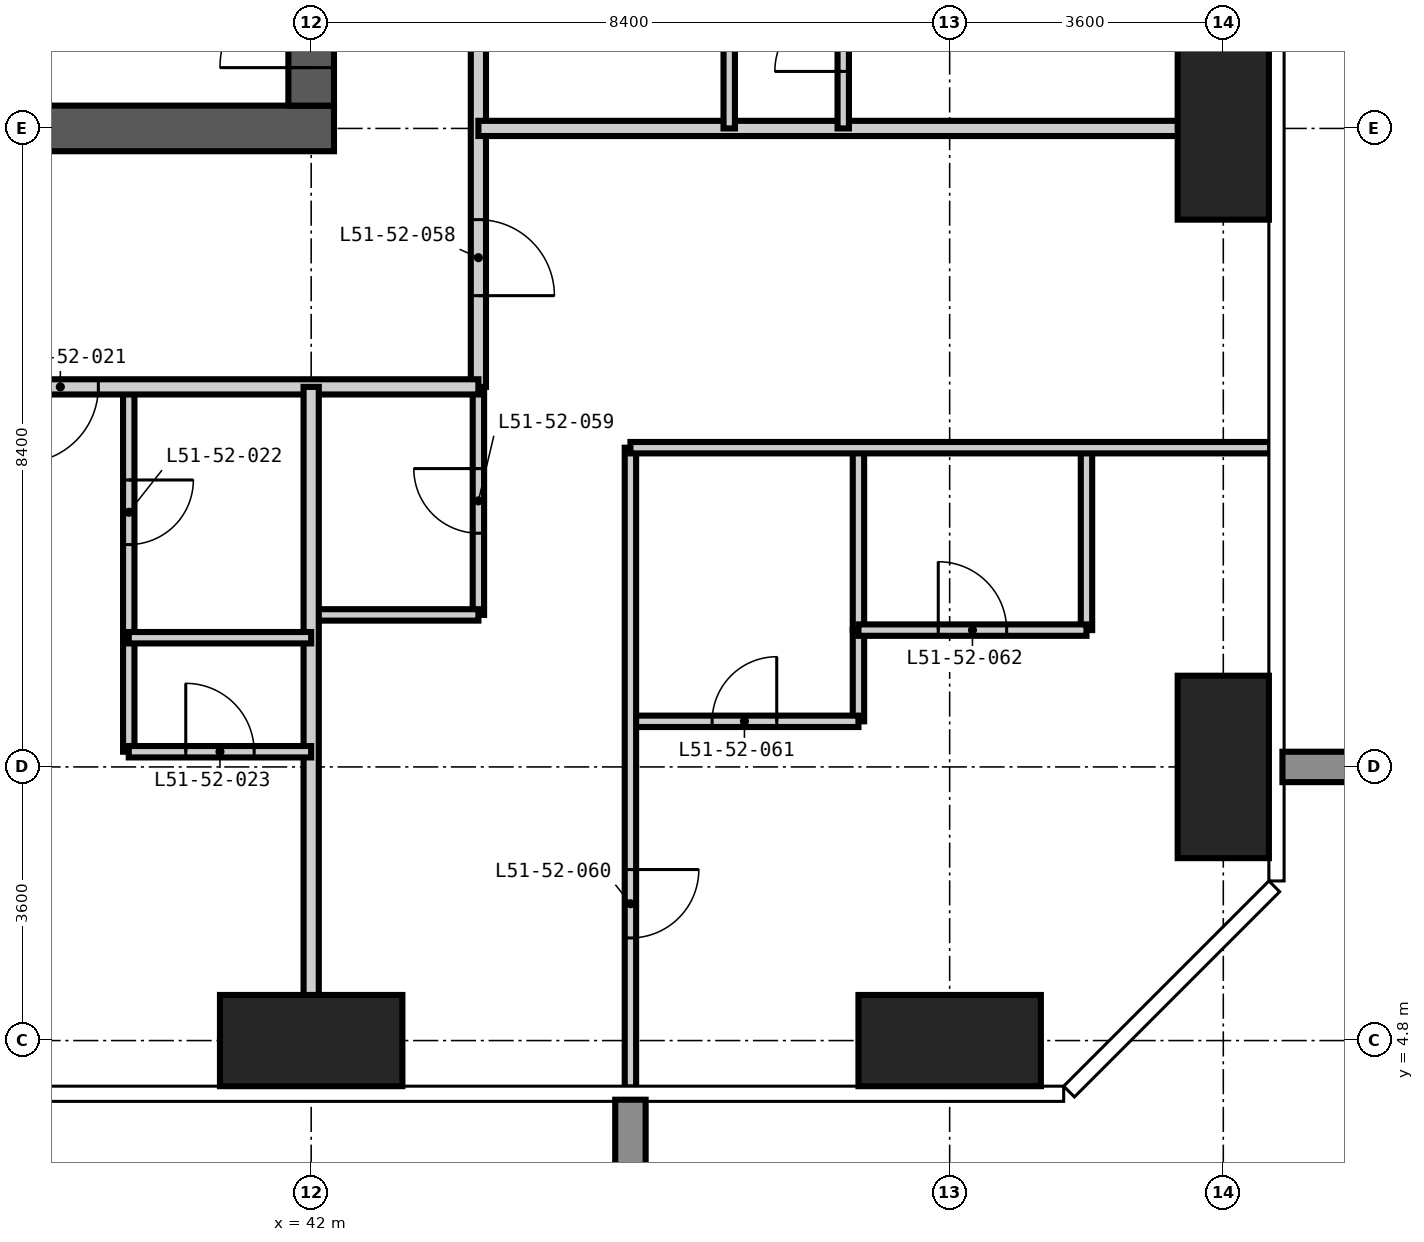
"""IFC4 building model, lengths in metres.
Left out: names, types, materials, properties, quantities, classifications, styles, units other than length and angle.
Written with IfcOpenShell. Run it as: python <this file> out.ifc"""

import sys

from ifc_helpers import new_model, si_unit, direction, frame, frame_2d, origin, origin_2d, place, context, subcontext, project, spatial, rectangle, extrude, element, fill, save


model = new_model("IFC4")
c1 = context("Model", 3, precision=1e-05, world=origin(), true_north=direction((0.0, 1.0)))
c2 = subcontext(c1, "Body", "Model", "MODEL_VIEW")
j1 = project(units=[si_unit("LENGTHUNIT", "METRE"), si_unit("PLANEANGLEUNIT", "RADIAN")], contexts=[c1])
p1 = place(None, origin())
s1 = spatial("IfcSite", under=j1, at=p1, CompositionType="ELEMENT")
p2 = place(p1, origin())
s2 = spatial("IfcBuilding", under=s1, at=p2, CompositionType="ELEMENT")
p3 = place(p2, frame((0.0, 0.0, 198.6)))
s3 = spatial("IfcBuildingStorey", under=s2, at=p3, CompositionType="ELEMENT", Elevation=198.6)
for number, where, z_axis, x_axis in (
    (1, (42.0, 4.8, -0.35), (0.0, 0.0, 1.0), (1.0, 0.0, 0.0)),
    (2, (50.4, 4.8, -0.35), (0.0, 0.0, 1.0), (1.0, 0.0, 0.0)),
):
    element("IfcColumn", number, at=place(p3, frame(where, z_axis=z_axis, x_axis=x_axis)), inside=s3, PredefinedType="COLUMN", context=c2, shape_type="SweptSolid", body=[
        extrude(rectangle(XDim=2.4, YDim=1.2, at=origin_2d()), origin(), (0.0, 0.0, 1.0), 3.6),
    ])
for number, where, z_axis, x_axis in (
    (3, (54.0, 8.4, -0.35), (0.0, 0.0, 1.0), (1.0, 0.0, 0.0)),
    (4, (54.0, 16.8, -0.35), (0.0, 0.0, 1.0), (1.0, 0.0, 0.0)),
):
    element("IfcColumn", number, at=place(p3, frame(where, z_axis=z_axis, x_axis=x_axis)), inside=s3, PredefinedType="COLUMN", context=c2, shape_type="SweptSolid", body=[
        extrude(rectangle(XDim=1.2, YDim=2.4, at=origin_2d()), origin(), (0.0, 0.0, 1.0), 3.6),
    ])
p4 = place(p3, frame((16.5, 16.8, -0.35), z_axis=(0.0, 0.0, 1.0), x_axis=(1.0, 0.0, 0.0)))
e5 = element("IfcWall", 5, at=p4, inside=s3, PredefinedType="SHEAR", context=c2, shape_type="SweptSolid", body=[
    extrude(rectangle(XDim=25.8, YDim=0.6, at=frame_2d((12.9, 0.0))), origin(), (0.0, 0.0, 1.0), 3.6),
])
p5 = place(p4, frame((12.4, 0.0, 0.35)))
e6 = element("IfcOpeningElement", 6, at=p5, cuts=e5, PredefinedType="OPENING", context=c2, shape_type="SweptSolid", body=[
    extrude(rectangle(XDim=1.0, YDim=2.1, at=frame_2d((0.5, 1.05))), frame((0.0, 0.31, 0.0), z_axis=(0.0, -1.0, 0.0), x_axis=(1.0, 0.0, 0.0)), (0.0, 0.0, 1.0), 0.62),
])
p6 = place(p4, frame((18.7, 0.0, 0.35)))
e7 = element("IfcOpeningElement", 7, at=p6, cuts=e5, PredefinedType="OPENING", context=c2, shape_type="SweptSolid", body=[
    extrude(rectangle(XDim=1.0, YDim=2.1, at=frame_2d((0.5, 1.05))), frame((0.0, 0.31, 0.0), z_axis=(0.0, -1.0, 0.0), x_axis=(1.0, 0.0, 0.0)), (0.0, 0.0, 1.0), 0.62),
])
p7 = place(p3, frame((42.0, 17.1, -0.35), z_axis=(0.0, 0.0, 1.0), x_axis=(0.0, 1.0, 0.0)))
e8 = element("IfcWall", 8, at=p7, inside=s3, PredefinedType="SHEAR", context=c2, shape_type="SweptSolid", body=[
    extrude(rectangle(XDim=24.6, YDim=0.6, at=frame_2d((12.3, 0.0))), origin(), (0.0, 0.0, 1.0), 3.6),
])
p8 = place(p7, frame((0.5, 0.0, 0.35)))
e9 = element("IfcOpeningElement", 9, at=p8, cuts=e8, PredefinedType="OPENING", context=c2, shape_type="SweptSolid", body=[
    extrude(rectangle(XDim=1.2, YDim=2.2, at=frame_2d((0.6, 1.1))), frame((0.0, 0.31, 0.0), z_axis=(0.0, -1.0, 0.0), x_axis=(1.0, 0.0, 0.0)), (0.0, 0.0, 1.0), 0.62),
])
p9 = place(p7, frame((11.8, 0.0, 0.35)))
e10 = element("IfcOpeningElement", 10, at=p9, cuts=e8, PredefinedType="OPENING", context=c2, shape_type="SweptSolid", body=[
    extrude(rectangle(XDim=1.0, YDim=2.1, at=frame_2d((0.5, 1.05))), frame((0.0, 0.31, 0.0), z_axis=(0.0, -1.0, 0.0), x_axis=(1.0, 0.0, 0.0)), (0.0, 0.0, 1.0), 0.62),
])
p10 = place(p7, frame((20.2, 0.0, 0.35)))
e11 = element("IfcOpeningElement", 11, at=p10, cuts=e8, PredefinedType="OPENING", context=c2, shape_type="SweptSolid", body=[
    extrude(rectangle(XDim=1.0, YDim=2.1, at=frame_2d((0.5, 1.05))), frame((0.0, 0.31, 0.0), z_axis=(0.0, -1.0, 0.0), x_axis=(1.0, 0.0, 0.0)), (0.0, 0.0, 1.0), 0.62),
])
p11 = place(p3, frame((39.6, 10.1, 0.0), z_axis=(0.0, 0.0, 1.0), x_axis=(0.0, 1.0, 0.0)))
e12 = element("IfcWall", 12, at=p11, inside=s3, PredefinedType="PARTITIONING", context=c2, shape_type="SweptSolid", body=[
    extrude(rectangle(XDim=3.3, YDim=0.15, at=frame_2d((1.65, 0.0))), origin(), (0.0, 0.0, 1.0), 3.25),
])
p12 = place(p11, frame((1.225, 0.0, 0.0)))
e13 = element("IfcOpeningElement", 13, at=p12, cuts=e12, PredefinedType="OPENING", context=c2, shape_type="SweptSolid", body=[
    extrude(rectangle(XDim=0.85, YDim=2.1, at=frame_2d((0.425, 1.05))), frame((0.0, 0.085, 0.0), z_axis=(0.0, -1.0, 0.0), x_axis=(1.0, 0.0, 0.0)), (0.0, 0.0, 1.0), 0.17),
])
p13 = place(p3, frame((44.2, 10.4, 0.0), z_axis=(0.0, 0.0, 1.0), x_axis=(0.0, 1.0, 0.0)))
e14 = element("IfcWall", 14, at=p13, inside=s3, PredefinedType="PARTITIONING", context=c2, shape_type="SweptSolid", body=[
    extrude(rectangle(XDim=3.0, YDim=0.15, at=frame_2d((1.5, 0.0))), origin(), (0.0, 0.0, 1.0), 3.25),
])
p14 = place(p13, frame((1.075, 0.0, 0.0)))
e15 = element("IfcOpeningElement", 15, at=p14, cuts=e14, PredefinedType="OPENING", context=c2, shape_type="SweptSolid", body=[
    extrude(rectangle(XDim=0.85, YDim=2.1, at=frame_2d((0.425, 1.05))), frame((0.0, 0.085, 0.0), z_axis=(0.0, -1.0, 0.0), x_axis=(1.0, 0.0, 0.0)), (0.0, 0.0, 1.0), 0.17),
])
p15 = place(p3, frame((49.2, 9.0, 0.0), z_axis=(0.0, 0.0, 1.0), x_axis=(0.0, 1.0, 0.0)))
e16 = element("IfcWall", 16, at=p15, inside=s3, PredefinedType="PARTITIONING", context=c2, shape_type="SweptSolid", body=[
    extrude(rectangle(XDim=1.2, YDim=0.15, at=frame_2d((0.6, 0.0))), origin(), (0.0, 0.0, 1.0), 3.25),
])
p16 = place(p3, frame((46.2, 9.0, 0.0), z_axis=(0.0, 0.0, 1.0), x_axis=(1.0, 0.0, 0.0)))
e17 = element("IfcWall", 17, at=p16, inside=s3, PredefinedType="PARTITIONING", context=c2, shape_type="SweptSolid", body=[
    extrude(rectangle(XDim=3.0, YDim=0.15, at=frame_2d((1.5, 0.0))), origin(), (0.0, 0.0, 1.0), 3.25),
])
p17 = place(p16, frame((1.075, 0.0, 0.0)))
e18 = element("IfcOpeningElement", 18, at=p17, cuts=e17, PredefinedType="OPENING", context=c2, shape_type="SweptSolid", body=[
    extrude(rectangle(XDim=0.85, YDim=2.1, at=frame_2d((0.425, 1.05))), frame((0.0, 0.085, 0.0), z_axis=(0.0, -1.0, 0.0), x_axis=(1.0, 0.0, 0.0)), (0.0, 0.0, 1.0), 0.17),
])
p18 = place(p3, frame((42.0, 10.4, 0.0), z_axis=(0.0, 0.0, 1.0), x_axis=(1.0, 0.0, 0.0)))
e19 = element("IfcWall", 19, at=p18, inside=s3, PredefinedType="PARTITIONING", context=c2, shape_type="SweptSolid", body=[
    extrude(rectangle(XDim=2.2, YDim=0.15, at=frame_2d((1.1, 0.0))), origin(), (0.0, 0.0, 1.0), 3.25),
])
p19 = place(p3, frame((44.2, 44.8, 0.0), z_axis=(0.0, 0.0, 1.0), x_axis=(0.0, -1.0, 0.0)))
e20 = element("IfcWall", 20, at=p19, inside=s3, PredefinedType="PARTITIONING", context=c2, shape_type="SweptSolid", body=[
    extrude(rectangle(XDim=31.4, YDim=0.2, at=frame_2d((15.7, 0.0))), origin(), (0.0, 0.0, 1.0), 3.25),
])
p20 = place(p19, frame((21.2, 0.0, 0.0)))
e21 = element("IfcOpeningElement", 21, at=p20, cuts=e20, PredefinedType="OPENING", context=c2, shape_type="SweptSolid", body=[
    extrude(rectangle(XDim=1.0, YDim=2.2, at=frame_2d((0.5, 1.1))), frame((0.0, 0.11, 0.0), z_axis=(0.0, -1.0, 0.0), x_axis=(1.0, 0.0, 0.0)), (0.0, 0.0, 1.0), 0.22),
])
p21 = place(p19, frame((8.6, 0.0, 0.0)))
e22 = element("IfcOpeningElement", 22, at=p21, cuts=e20, PredefinedType="OPENING", context=c2, shape_type="SweptSolid", body=[
    extrude(rectangle(XDim=1.0, YDim=2.2, at=frame_2d((0.5, 1.1))), frame((0.0, 0.11, 0.0), z_axis=(0.0, -1.0, 0.0), x_axis=(1.0, 0.0, 0.0)), (0.0, 0.0, 1.0), 0.22),
])
p22 = place(p19, frame((29.2, 0.0, 0.0)))
e23 = element("IfcOpeningElement", 23, at=p22, cuts=e20, PredefinedType="OPENING", context=c2, shape_type="SweptSolid", body=[
    extrude(rectangle(XDim=1.0, YDim=2.2, at=frame_2d((0.5, 1.1))), frame((0.0, 0.11, 0.0), z_axis=(0.0, -1.0, 0.0), x_axis=(1.0, 0.0, 0.0)), (0.0, 0.0, 1.0), 0.22),
])
p23 = place(p19, frame((0.9, 0.0, 0.0)))
e24 = element("IfcOpeningElement", 24, at=p23, cuts=e20, PredefinedType="OPENING", context=c2, shape_type="SweptSolid", body=[
    extrude(rectangle(XDim=1.0, YDim=2.2, at=frame_2d((0.5, 1.1))), frame((0.0, 0.11, 0.0), z_axis=(0.0, -1.0, 0.0), x_axis=(1.0, 0.0, 0.0)), (0.0, 0.0, 1.0), 0.22),
])
p24 = place(p3, frame((44.2, 13.4, 0.0), z_axis=(0.0, 0.0, 1.0), x_axis=(-1.0, 0.0, 0.0)))
e25 = element("IfcWall", 25, at=p24, inside=s3, PredefinedType="PARTITIONING", context=c2, shape_type="SweptSolid", body=[
    extrude(rectangle(XDim=30.8, YDim=0.2, at=frame_2d((15.4, 0.0))), origin(), (0.0, 0.0, 1.0), 3.25),
])
p25 = place(p24, frame((23.6, 0.0, 0.0)))
e26 = element("IfcOpeningElement", 26, at=p25, cuts=e25, PredefinedType="OPENING", context=c2, shape_type="SweptSolid", body=[
    extrude(rectangle(XDim=1.0, YDim=2.2, at=frame_2d((0.5, 1.1))), frame((0.0, 0.11, 0.0), z_axis=(0.0, -1.0, 0.0), x_axis=(1.0, 0.0, 0.0)), (0.0, 0.0, 1.0), 0.22),
])
p26 = place(p24, frame((21.8, 0.0, 0.0)))
e27 = element("IfcOpeningElement", 27, at=p26, cuts=e25, PredefinedType="OPENING", context=c2, shape_type="SweptSolid", body=[
    extrude(rectangle(XDim=1.0, YDim=2.2, at=frame_2d((0.5, 1.1))), frame((0.0, 0.11, 0.0), z_axis=(0.0, -1.0, 0.0), x_axis=(1.0, 0.0, 0.0)), (0.0, 0.0, 1.0), 0.22),
])
p27 = place(p24, frame((15.5, 0.0, 0.0)))
e28 = element("IfcOpeningElement", 28, at=p27, cuts=e25, PredefinedType="OPENING", context=c2, shape_type="SweptSolid", body=[
    extrude(rectangle(XDim=1.0, YDim=2.2, at=frame_2d((0.5, 1.1))), frame((0.0, 0.11, 0.0), z_axis=(0.0, -1.0, 0.0), x_axis=(1.0, 0.0, 0.0)), (0.0, 0.0, 1.0), 0.22),
])
p28 = place(p24, frame((5.0, 0.0, 0.0)))
e29 = element("IfcOpeningElement", 29, at=p28, cuts=e25, PredefinedType="OPENING", context=c2, shape_type="SweptSolid", body=[
    extrude(rectangle(XDim=1.0, YDim=2.2, at=frame_2d((0.5, 1.1))), frame((0.0, 0.11, 0.0), z_axis=(0.0, -1.0, 0.0), x_axis=(1.0, 0.0, 0.0)), (0.0, 0.0, 1.0), 0.22),
])
p29 = place(p3, frame((42.0, 4.182, 0.0), z_axis=(0.0, 0.0, 1.0), x_axis=(0.0, 1.0, 0.0)))
e30 = element("IfcWall", 30, at=p29, inside=s3, PredefinedType="PARTITIONING", context=c2, shape_type="SweptSolid", body=[
    extrude(rectangle(XDim=9.218, YDim=0.2, at=frame_2d((4.609, 0.0))), origin(), (0.0, 0.0, 1.0), 3.25),
])
p30 = place(p3, frame((44.2, 16.8, 0.0), z_axis=(0.0, 0.0, 1.0), x_axis=(1.0, 0.0, 0.0)))
e31 = element("IfcWall", 31, at=p30, inside=s3, PredefinedType="PARTITIONING", context=c2, shape_type="SweptSolid", body=[
    extrude(rectangle(XDim=10.418, YDim=0.2, at=frame_2d((5.209, 0.0))), origin(), (0.0, 0.0, 1.0), 3.25),
])
p31 = place(p3, frame((39.6, 8.6, 0.0), z_axis=(0.0, 0.0, 1.0), x_axis=(0.0, 1.0, 0.0)))
e32 = element("IfcWall", 32, at=p31, inside=s3, PredefinedType="PARTITIONING", context=c2, shape_type="SweptSolid", body=[
    extrude(rectangle(XDim=1.5, YDim=0.15, at=frame_2d((0.75, 0.0))), origin(), (0.0, 0.0, 1.0), 3.25),
])
p32 = place(p3, frame((46.2, 4.182, 0.0), z_axis=(0.0, 0.0, 1.0), x_axis=(0.0, 1.0, 0.0)))
e33 = element("IfcWall", 33, at=p32, inside=s3, PredefinedType="PARTITIONING", context=c2, shape_type="SweptSolid", body=[
    extrude(rectangle(XDim=8.418, YDim=0.15, at=frame_2d((4.209, 0.0))), origin(), (0.0, 0.0, 1.0), 3.25),
])
p33 = place(p32, frame((1.968, 0.0, 0.0)))
e34 = element("IfcOpeningElement", 34, at=p33, cuts=e33, PredefinedType="OPENING", context=c2, shape_type="SweptSolid", body=[
    extrude(rectangle(XDim=0.9, YDim=2.1, at=frame_2d((0.45, 1.05))), frame((0.0, 0.085, 0.0), z_axis=(0.0, -1.0, 0.0), x_axis=(1.0, 0.0, 0.0)), (0.0, 0.0, 1.0), 0.17),
])
p34 = place(p3, frame((47.5, 16.8, 0.0), z_axis=(0.0, 0.0, 1.0), x_axis=(0.0, 1.0, 0.0)))
e35 = element("IfcWall", 35, at=p34, inside=s3, PredefinedType="PARTITIONING", context=c2, shape_type="SweptSolid", body=[
    extrude(rectangle(XDim=2.4, YDim=0.15, at=frame_2d((1.2, 0.0))), origin(), (0.0, 0.0, 1.0), 3.25),
])
p35 = place(p3, frame((49.0, 16.8, 0.0), z_axis=(0.0, 0.0, 1.0), x_axis=(0.0, 1.0, 0.0)))
e36 = element("IfcWall", 36, at=p35, inside=s3, PredefinedType="PARTITIONING", context=c2, shape_type="SweptSolid", body=[
    extrude(rectangle(XDim=2.4, YDim=0.15, at=frame_2d((1.2, 0.0))), origin(), (0.0, 0.0, 1.0), 3.25),
])
p36 = place(p35, frame((0.75, 0.0, 0.0)))
e37 = element("IfcOpeningElement", 37, at=p36, cuts=e36, PredefinedType="OPENING", context=c2, shape_type="SweptSolid", body=[
    extrude(rectangle(XDim=0.9, YDim=2.1, at=frame_2d((0.45, 1.05))), frame((0.0, 0.085, 0.0), z_axis=(0.0, -1.0, 0.0), x_axis=(1.0, 0.0, 0.0)), (0.0, 0.0, 1.0), 0.17),
])
for number, where, z_axis, x_axis in (
    (38, (49.2, 10.2, 0.0), (0.0, 0.0, 1.0), (0.0, 1.0, 0.0)),
    (39, (52.2, 10.2, 0.0), (0.0, 0.0, 1.0), (0.0, 1.0, 0.0)),
):
    element("IfcWall", number, at=place(p3, frame(where, z_axis=z_axis, x_axis=x_axis)), inside=s3, PredefinedType="PARTITIONING", context=c2, shape_type="SweptSolid", body=[
        extrude(rectangle(XDim=2.4, YDim=0.15, at=frame_2d((1.2, 0.0))), origin(), (0.0, 0.0, 1.0), 3.25),
    ])
p37 = place(p3, frame((39.6, 8.6, 0.0), z_axis=(0.0, 0.0, 1.0), x_axis=(1.0, 0.0, 0.0)))
e40 = element("IfcWall", 40, at=p37, inside=s3, PredefinedType="PARTITIONING", context=c2, shape_type="SweptSolid", body=[
    extrude(rectangle(XDim=2.4, YDim=0.15, at=frame_2d((1.2, 0.0))), origin(), (0.0, 0.0, 1.0), 3.25),
])
p38 = place(p37, frame((0.75, 0.0, 0.0)))
e41 = element("IfcOpeningElement", 41, at=p38, cuts=e40, PredefinedType="OPENING", context=c2, shape_type="SweptSolid", body=[
    extrude(rectangle(XDim=0.9, YDim=2.1, at=frame_2d((0.45, 1.05))), frame((0.0, 0.085, 0.0), z_axis=(0.0, -1.0, 0.0), x_axis=(1.0, 0.0, 0.0)), (0.0, 0.0, 1.0), 0.17),
])
p39 = place(p3, frame((39.6, 10.1, 0.0), z_axis=(0.0, 0.0, 1.0), x_axis=(1.0, 0.0, 0.0)))
e42 = element("IfcWall", 42, at=p39, inside=s3, PredefinedType="PARTITIONING", context=c2, shape_type="SweptSolid", body=[
    extrude(rectangle(XDim=2.4, YDim=0.15, at=frame_2d((1.2, 0.0))), origin(), (0.0, 0.0, 1.0), 3.25),
])
p40 = place(p3, frame((49.2, 10.2, 0.0), z_axis=(0.0, 0.0, 1.0), x_axis=(1.0, 0.0, 0.0)))
e43 = element("IfcWall", 43, at=p40, inside=s3, PredefinedType="PARTITIONING", context=c2, shape_type="SweptSolid", body=[
    extrude(rectangle(XDim=3.0, YDim=0.15, at=frame_2d((1.5, 0.0))), origin(), (0.0, 0.0, 1.0), 3.25),
])
p41 = place(p40, frame((1.05, 0.0, 0.0)))
e44 = element("IfcOpeningElement", 44, at=p41, cuts=e43, PredefinedType="OPENING", context=c2, shape_type="SweptSolid", body=[
    extrude(rectangle(XDim=0.9, YDim=2.1, at=frame_2d((0.45, 1.05))), frame((0.0, 0.085, 0.0), z_axis=(0.0, -1.0, 0.0), x_axis=(1.0, 0.0, 0.0)), (0.0, 0.0, 1.0), 0.17),
])
p42 = place(p3, frame((46.2, 12.6, 0.0), z_axis=(0.0, 0.0, 1.0), x_axis=(1.0, 0.0, 0.0)))
e45 = element("IfcWall", 45, at=p42, inside=s3, PredefinedType="PARTITIONING", context=c2, shape_type="SweptSolid", body=[
    extrude(rectangle(XDim=8.418, YDim=0.15, at=frame_2d((4.209, 0.0))), origin(), (0.0, 0.0, 1.0), 3.25),
])
p43 = place(p8, origin())
e46 = element("IfcDoor", 46, at=p43, inside=s3, OperationType="SINGLE_SWING_LEFT", PredefinedType="DOOR", context=c2, shape_type="SweptSolid", body=[
    extrude(rectangle(XDim=1.2, YDim=2.2, at=frame_2d((0.6, 1.1))), frame((0.0, 0.025, 0.0), z_axis=(0.0, -1.0, 0.0), x_axis=(1.0, 0.0, 0.0)), (0.0, 0.0, 1.0), 0.05),
])
fill(e9, e46)
p44 = place(p28, origin())
e47 = element("IfcDoor", 47, at=p44, inside=s3, OperationType="SINGLE_SWING_RIGHT", PredefinedType="DOOR", context=c2, shape_type="SweptSolid", body=[
    extrude(rectangle(XDim=1.0, YDim=2.2, at=frame_2d((0.5, 1.1))), frame((0.0, 0.025, 0.0), z_axis=(0.0, -1.0, 0.0), x_axis=(1.0, 0.0, 0.0)), (0.0, 0.0, 1.0), 0.05),
])
fill(e29, e47)
p45 = place(p12, frame((0.85, 0.0, 0.0), z_axis=(0.0, 0.0, 1.0), x_axis=(-1.0, 0.0, 0.0)))
e48 = element("IfcDoor", 48, at=p45, inside=s3, OperationType="SINGLE_SWING_LEFT", PredefinedType="DOOR", context=c2, shape_type="SweptSolid", body=[
    extrude(rectangle(XDim=0.85, YDim=2.1, at=frame_2d((0.425, 1.05))), frame((0.0, 0.025, 0.0), z_axis=(0.0, -1.0, 0.0), x_axis=(1.0, 0.0, 0.0)), (0.0, 0.0, 1.0), 0.05),
])
fill(e13, e48)
p46 = place(p38, origin())
e49 = element("IfcDoor", 49, at=p46, inside=s3, OperationType="SINGLE_SWING_LEFT", PredefinedType="DOOR", context=c2, shape_type="SweptSolid", body=[
    extrude(rectangle(XDim=0.9, YDim=2.1, at=frame_2d((0.45, 1.05))), frame((0.0, 0.025, 0.0), z_axis=(0.0, -1.0, 0.0), x_axis=(1.0, 0.0, 0.0)), (0.0, 0.0, 1.0), 0.05),
])
fill(e41, e49)
p47 = place(p36, origin())
e50 = element("IfcDoor", 50, at=p47, inside=s3, OperationType="SINGLE_SWING_LEFT", PredefinedType="DOOR", context=c2, shape_type="SweptSolid", body=[
    extrude(rectangle(XDim=0.9, YDim=2.1, at=frame_2d((0.45, 1.05))), frame((0.0, 0.025, 0.0), z_axis=(0.0, -1.0, 0.0), x_axis=(1.0, 0.0, 0.0)), (0.0, 0.0, 1.0), 0.05),
])
fill(e37, e50)
p48 = place(p22, origin())
e51 = element("IfcDoor", 51, at=p48, inside=s3, OperationType="SINGLE_SWING_RIGHT", PredefinedType="DOOR", context=c2, shape_type="SweptSolid", body=[
    extrude(rectangle(XDim=1.0, YDim=2.2, at=frame_2d((0.5, 1.1))), frame((0.0, 0.025, 0.0), z_axis=(0.0, -1.0, 0.0), x_axis=(1.0, 0.0, 0.0)), (0.0, 0.0, 1.0), 0.05),
])
fill(e23, e51)
p49 = place(p14, origin())
e52 = element("IfcDoor", 52, at=p49, inside=s3, OperationType="SINGLE_SWING_RIGHT", PredefinedType="DOOR", context=c2, shape_type="SweptSolid", body=[
    extrude(rectangle(XDim=0.85, YDim=2.1, at=frame_2d((0.425, 1.05))), frame((0.0, 0.025, 0.0), z_axis=(0.0, -1.0, 0.0), x_axis=(1.0, 0.0, 0.0)), (0.0, 0.0, 1.0), 0.05),
])
fill(e15, e52)
p50 = place(p33, frame((0.9, 0.0, 0.0), z_axis=(0.0, 0.0, 1.0), x_axis=(-1.0, 0.0, 0.0)))
e53 = element("IfcDoor", 53, at=p50, inside=s3, OperationType="SINGLE_SWING_LEFT", PredefinedType="DOOR", context=c2, shape_type="SweptSolid", body=[
    extrude(rectangle(XDim=0.9, YDim=2.1, at=frame_2d((0.45, 1.05))), frame((0.0, 0.025, 0.0), z_axis=(0.0, -1.0, 0.0), x_axis=(1.0, 0.0, 0.0)), (0.0, 0.0, 1.0), 0.05),
])
fill(e34, e53)
p51 = place(p17, origin())
e54 = element("IfcDoor", 54, at=p51, inside=s3, OperationType="SINGLE_SWING_RIGHT", PredefinedType="DOOR", context=c2, shape_type="SweptSolid", body=[
    extrude(rectangle(XDim=0.85, YDim=2.1, at=frame_2d((0.425, 1.05))), frame((0.0, 0.025, 0.0), z_axis=(0.0, -1.0, 0.0), x_axis=(1.0, 0.0, 0.0)), (0.0, 0.0, 1.0), 0.05),
])
fill(e18, e54)
p52 = place(p41, origin())
e55 = element("IfcDoor", 55, at=p52, inside=s3, OperationType="SINGLE_SWING_LEFT", PredefinedType="DOOR", context=c2, shape_type="SweptSolid", body=[
    extrude(rectangle(XDim=0.9, YDim=2.1, at=frame_2d((0.45, 1.05))), frame((0.0, 0.025, 0.0), z_axis=(0.0, -1.0, 0.0), x_axis=(1.0, 0.0, 0.0)), (0.0, 0.0, 1.0), 0.05),
])
fill(e44, e55)
save(model, sys.argv[1])
